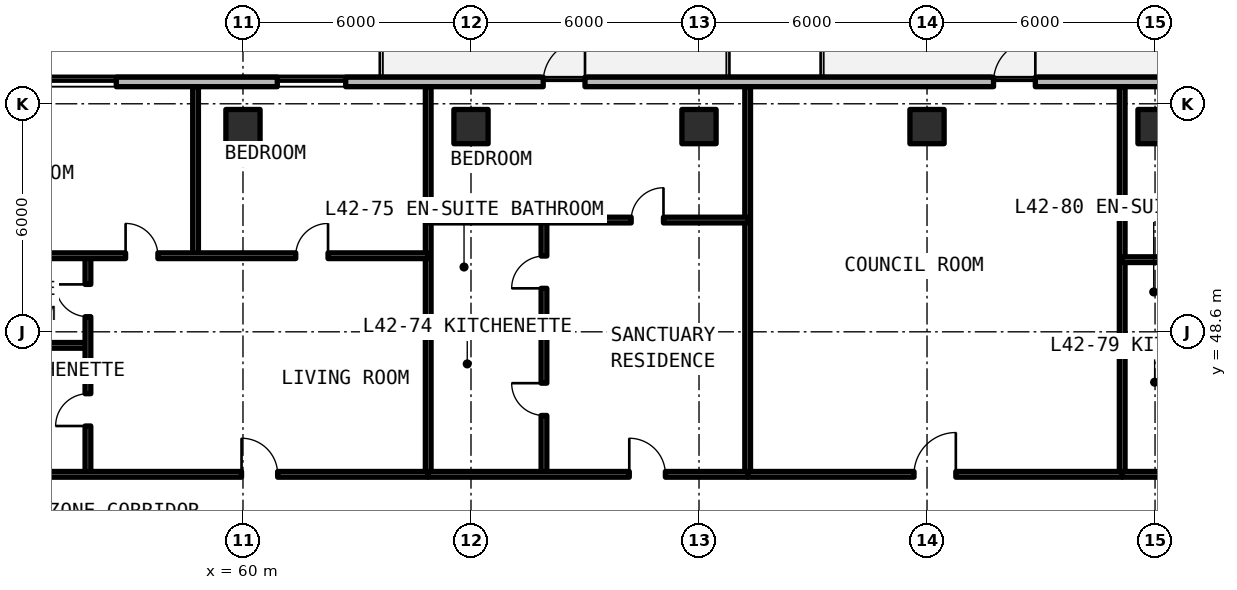
"""IFC4 building model, lengths in metres.
Left out: names, types, materials, properties, quantities, classifications, styles, units other than length and angle.
Written with IfcOpenShell. Run it as: python <this file> out.ifc"""

import sys

from ifc_helpers import new_model, si_unit, direction, frame, frame_2d, origin, origin_2d, place, context, subcontext, project, spatial, rectangle, extrude, element, fill, save


model = new_model("IFC4")
c1 = context("Model", 3, precision=1e-05, world=origin(), true_north=direction((0.0, 1.0)))
c2 = subcontext(c1, "Body", "Model", "MODEL_VIEW")
j1 = project(units=[si_unit("LENGTHUNIT", "METRE"), si_unit("PLANEANGLEUNIT", "RADIAN")], contexts=[c1])
p1 = place(None, origin())
s1 = spatial("IfcSite", under=j1, at=p1, CompositionType="ELEMENT")
p2 = place(p1, origin())
s2 = spatial("IfcBuilding", under=s1, at=p2, CompositionType="ELEMENT")
p3 = place(p2, frame((0.0, 0.0, 151.8)))
s3 = spatial("IfcBuildingStorey", under=s2, at=p3, CompositionType="ELEMENT", Elevation=151.8)
for number, where, z_axis, x_axis in (
    (1, (60.0, 54.0, 0.0), (0.0, 0.0, 1.0), (1.0, 0.0, 0.0)),
    (2, (66.0, 54.0, 0.0), (0.0, 0.0, 1.0), (1.0, 0.0, 0.0)),
    (3, (72.0, 54.0, 0.0), (0.0, 0.0, 1.0), (1.0, 0.0, 0.0)),
    (4, (78.0, 54.0, 0.0), (0.0, 0.0, 1.0), (1.0, 0.0, 0.0)),
    (5, (84.0, 54.0, 0.0), (0.0, 0.0, 1.0), (1.0, 0.0, 0.0)),
):
    element("IfcColumn", number, at=place(p3, frame(where, z_axis=z_axis, x_axis=x_axis)), inside=s3, PredefinedType="COLUMN", context=c2, shape_type="SweptSolid", body=[
        extrude(rectangle(XDim=0.9, YDim=0.9, at=origin_2d()), origin(), (0.0, 0.0, 1.0), 3.3),
    ])
p4 = place(p3, frame((95.748, 55.175, 0.0), z_axis=(0.0, 0.0, 1.0), x_axis=(-1.0, 0.0, 0.0)))
e6 = element("IfcWall", 6, at=p4, inside=s3, PredefinedType="SOLIDWALL", context=c2, shape_type="SweptSolid", body=[
    extrude(rectangle(XDim=43.623, YDim=0.25, at=frame_2d((21.812, 0.0))), origin(), (0.0, 0.0, 1.0), 3.08),
])
p5 = place(p4, frame((26.748, 0.0, 0.0)))
e7 = element("IfcOpeningElement", 7, at=p5, cuts=e6, PredefinedType="OPENING", context=c2, shape_type="SweptSolid", body=[
    extrude(rectangle(XDim=1.1, YDim=2.15, at=frame_2d((0.55, 1.075))), frame((0.0, 0.135, 0.0), z_axis=(0.0, -1.0, 0.0), x_axis=(1.0, 0.0, 0.0)), (0.0, 0.0, 1.0), 0.27),
])
p6 = place(p4, frame((14.898, 0.0, 0.0)))
e8 = element("IfcOpeningElement", 8, at=p6, cuts=e6, PredefinedType="OPENING", context=c2, shape_type="SweptSolid", body=[
    extrude(rectangle(XDim=1.1, YDim=2.15, at=frame_2d((0.55, 1.075))), frame((0.0, 0.135, 0.0), z_axis=(0.0, -1.0, 0.0), x_axis=(1.0, 0.0, 0.0)), (0.0, 0.0, 1.0), 0.27),
])
p7 = place(p4, frame((39.082, 0.0, 0.78)))
e9 = element("IfcOpeningElement", 9, at=p7, cuts=e6, PredefinedType="OPENING", context=c2, shape_type="SweptSolid", body=[
    extrude(rectangle(XDim=1.8, YDim=1.66, at=frame_2d((0.9, 0.83))), frame((0.0, 0.135, 0.0), z_axis=(0.0, -1.0, 0.0), x_axis=(1.0, 0.0, 0.0)), (0.0, 0.0, 1.0), 0.27),
])
p8 = place(p4, frame((33.045, 0.0, 0.78)))
e10 = element("IfcOpeningElement", 10, at=p8, cuts=e6, PredefinedType="OPENING", context=c2, shape_type="SweptSolid", body=[
    extrude(rectangle(XDim=1.8, YDim=1.66, at=frame_2d((0.9, 0.83))), frame((0.0, 0.135, 0.0), z_axis=(0.0, -1.0, 0.0), x_axis=(1.0, 0.0, 0.0)), (0.0, 0.0, 1.0), 0.27),
])
p9 = place(p4, frame((8.462, 0.0, 0.78)))
e11 = element("IfcOpeningElement", 11, at=p9, cuts=e6, PredefinedType="OPENING", context=c2, shape_type="SweptSolid", body=[
    extrude(rectangle(XDim=1.8, YDim=1.66, at=frame_2d((0.9, 0.83))), frame((0.0, 0.135, 0.0), z_axis=(0.0, -1.0, 0.0), x_axis=(1.0, 0.0, 0.0)), (0.0, 0.0, 1.0), 0.27),
])
p10 = place(p4, frame((2.25, 0.0, 0.78)))
e12 = element("IfcOpeningElement", 12, at=p10, cuts=e6, PredefinedType="OPENING", context=c2, shape_type="SweptSolid", body=[
    extrude(rectangle(XDim=1.8, YDim=1.66, at=frame_2d((0.9, 0.83))), frame((0.0, 0.135, 0.0), z_axis=(0.0, -1.0, 0.0), x_axis=(1.0, 0.0, 0.0)), (0.0, 0.0, 1.0), 0.27),
])
p11 = place(p3, frame((64.874, 44.85, 0.0), z_axis=(0.0, 0.0, 1.0), x_axis=(0.0, 1.0, 0.0)))
e13 = element("IfcWall", 13, at=p11, inside=s3, PredefinedType="SOLIDWALL", context=c2, shape_type="SweptSolid", body=[
    extrude(rectangle(XDim=10.2, YDim=0.15, at=frame_2d((5.1, 0.0))), origin(), (0.0, 0.0, 1.0), 2.35),
])
p12 = place(p3, frame((52.12, 48.244, 0.0), z_axis=(0.0, 0.0, 1.0), x_axis=(1.0, 0.0, 0.0)))
e14 = element("IfcWall", 14, at=p12, inside=s3, PredefinedType="PARTITIONING", context=c2, shape_type="SweptSolid", body=[
    extrude(rectangle(XDim=3.8, YDim=0.15, at=frame_2d((1.9, 0.0))), origin(), (0.0, 0.0, 1.0), 2.35),
])
p13 = place(p3, frame((55.92, 44.85, 0.0), z_axis=(0.0, 0.0, 1.0), x_axis=(0.0, 1.0, 0.0)))
e15 = element("IfcWall", 15, at=p13, inside=s3, PredefinedType="PARTITIONING", context=c2, shape_type="SweptSolid", body=[
    extrude(rectangle(XDim=5.752, YDim=0.15, at=frame_2d((2.876, 0.0))), origin(), (0.0, 0.0, 1.0), 2.35),
])
p14 = place(p13, frame((1.272, 0.0, 0.0)))
e16 = element("IfcOpeningElement", 16, at=p14, cuts=e15, PredefinedType="OPENING", context=c2, shape_type="SweptSolid", body=[
    extrude(rectangle(XDim=0.85, YDim=2.1, at=frame_2d((0.425, 1.05))), frame((0.0, 0.085, 0.0), z_axis=(0.0, -1.0, 0.0), x_axis=(1.0, 0.0, 0.0)), (0.0, 0.0, 1.0), 0.17),
])
p15 = place(p13, frame((4.148, 0.0, 0.0)))
e17 = element("IfcOpeningElement", 17, at=p15, cuts=e15, PredefinedType="OPENING", context=c2, shape_type="SweptSolid", body=[
    extrude(rectangle(XDim=0.85, YDim=2.1, at=frame_2d((0.425, 1.05))), frame((0.0, 0.085, 0.0), z_axis=(0.0, -1.0, 0.0), x_axis=(1.0, 0.0, 0.0)), (0.0, 0.0, 1.0), 0.17),
])
p16 = place(p3, frame((58.752, 50.602, 0.0), z_axis=(0.0, 0.0, 1.0), x_axis=(0.0, 1.0, 0.0)))
e18 = element("IfcWall", 18, at=p16, inside=s3, PredefinedType="PARTITIONING", context=c2, shape_type="SweptSolid", body=[
    extrude(rectangle(XDim=4.448, YDim=0.15, at=frame_2d((2.224, 0.0))), origin(), (0.0, 0.0, 1.0), 2.35),
])
p17 = place(p3, frame((52.12, 50.602, 0.0), z_axis=(0.0, 0.0, 1.0), x_axis=(1.0, 0.0, 0.0)))
e19 = element("IfcWall", 19, at=p17, inside=s3, PredefinedType="PARTITIONING", context=c2, shape_type="SweptSolid", body=[
    extrude(rectangle(XDim=12.754, YDim=0.15, at=frame_2d((6.377, 0.0))), origin(), (0.0, 0.0, 1.0), 2.35),
])
p18 = place(p17, frame((4.791, 0.0, 0.0)))
e20 = element("IfcOpeningElement", 20, at=p18, cuts=e19, PredefinedType="OPENING", context=c2, shape_type="SweptSolid", body=[
    extrude(rectangle(XDim=0.85, YDim=2.1, at=frame_2d((0.425, 1.05))), frame((0.0, 0.085, 0.0), z_axis=(0.0, -1.0, 0.0), x_axis=(1.0, 0.0, 0.0)), (0.0, 0.0, 1.0), 0.17),
])
p19 = place(p17, frame((9.268, 0.0, 0.0)))
e21 = element("IfcOpeningElement", 21, at=p19, cuts=e19, PredefinedType="OPENING", context=c2, shape_type="SweptSolid", body=[
    extrude(rectangle(XDim=0.85, YDim=2.1, at=frame_2d((0.425, 1.05))), frame((0.0, 0.085, 0.0), z_axis=(0.0, -1.0, 0.0), x_axis=(1.0, 0.0, 0.0)), (0.0, 0.0, 1.0), 0.17),
])
p20 = place(p3, frame((52.12, 44.85, 0.0), z_axis=(0.0, 0.0, 1.0), x_axis=(1.0, 0.0, 0.0)))
e22 = element("IfcWall", 22, at=p20, inside=s3, PredefinedType="SOLIDWALL", context=c2, shape_type="SweptSolid", body=[
    extrude(rectangle(XDim=12.754, YDim=0.15, at=frame_2d((6.377, 0.0))), origin(), (0.0, 0.0, 1.0), 2.35),
])
p21 = place(p20, frame((7.842, 0.0, 0.0)))
e23 = element("IfcOpeningElement", 23, at=p21, cuts=e22, PredefinedType="OPENING", context=c2, shape_type="SweptSolid", body=[
    extrude(rectangle(XDim=0.95, YDim=2.15, at=frame_2d((0.475, 1.075))), frame((0.0, 0.085, 0.0), z_axis=(0.0, -1.0, 0.0), x_axis=(1.0, 0.0, 0.0)), (0.0, 0.0, 1.0), 0.17),
])
p22 = place(p3, frame((73.28, 44.85, 0.0), z_axis=(0.0, 0.0, 1.0), x_axis=(0.0, 1.0, 0.0)))
e24 = element("IfcWall", 24, at=p22, inside=s3, PredefinedType="SOLIDWALL", context=c2, shape_type="SweptSolid", body=[
    extrude(rectangle(XDim=10.2, YDim=0.15, at=frame_2d((5.1, 0.0))), origin(), (0.0, 0.0, 1.0), 2.35),
])
p23 = place(p3, frame((64.874, 48.798, 0.0), z_axis=(0.0, 0.0, 1.0), x_axis=(1.0, 0.0, 0.0)))
e25 = element("IfcWall", 25, at=p23, inside=s3, PredefinedType="PARTITIONING", context=c2, shape_type="SweptSolid", body=[
    extrude(rectangle(XDim=3.046, YDim=0.15, at=frame_2d((1.523, 0.0))), origin(), (0.0, 0.0, 1.0), 2.35),
])
p24 = place(p3, frame((67.92, 44.85, 0.0), z_axis=(0.0, 0.0, 1.0), x_axis=(0.0, 1.0, 0.0)))
e26 = element("IfcWall", 26, at=p24, inside=s3, PredefinedType="PARTITIONING", context=c2, shape_type="SweptSolid", body=[
    extrude(rectangle(XDim=6.69, YDim=0.15, at=frame_2d((3.345, 0.0))), origin(), (0.0, 0.0, 1.0), 2.35),
])
p25 = place(p24, frame((1.549, 0.0, 0.0)))
e27 = element("IfcOpeningElement", 27, at=p25, cuts=e26, PredefinedType="OPENING", context=c2, shape_type="SweptSolid", body=[
    extrude(rectangle(XDim=0.85, YDim=2.1, at=frame_2d((0.425, 1.05))), frame((0.0, 0.085, 0.0), z_axis=(0.0, -1.0, 0.0), x_axis=(1.0, 0.0, 0.0)), (0.0, 0.0, 1.0), 0.17),
])
p26 = place(p24, frame((4.894, 0.0, 0.0)))
e28 = element("IfcOpeningElement", 28, at=p26, cuts=e26, PredefinedType="OPENING", context=c2, shape_type="SweptSolid", body=[
    extrude(rectangle(XDim=0.85, YDim=2.1, at=frame_2d((0.425, 1.05))), frame((0.0, 0.085, 0.0), z_axis=(0.0, -1.0, 0.0), x_axis=(1.0, 0.0, 0.0)), (0.0, 0.0, 1.0), 0.17),
])
p27 = place(p3, frame((64.874, 51.541, 0.0), z_axis=(0.0, 0.0, 1.0), x_axis=(1.0, 0.0, 0.0)))
e29 = element("IfcWall", 29, at=p27, inside=s3, PredefinedType="PARTITIONING", context=c2, shape_type="SweptSolid", body=[
    extrude(rectangle(XDim=8.406, YDim=0.15, at=frame_2d((4.203, 0.0))), origin(), (0.0, 0.0, 1.0), 2.35),
])
p28 = place(p27, frame((5.341, 0.0, 0.0)))
e30 = element("IfcOpeningElement", 30, at=p28, cuts=e29, PredefinedType="OPENING", context=c2, shape_type="SweptSolid", body=[
    extrude(rectangle(XDim=0.85, YDim=2.1, at=frame_2d((0.425, 1.05))), frame((0.0, 0.085, 0.0), z_axis=(0.0, -1.0, 0.0), x_axis=(1.0, 0.0, 0.0)), (0.0, 0.0, 1.0), 0.17),
])
p29 = place(p3, frame((64.874, 44.85, 0.0), z_axis=(0.0, 0.0, 1.0), x_axis=(1.0, 0.0, 0.0)))
e31 = element("IfcWall", 31, at=p29, inside=s3, PredefinedType="SOLIDWALL", context=c2, shape_type="SweptSolid", body=[
    extrude(rectangle(XDim=8.406, YDim=0.15, at=frame_2d((4.203, 0.0))), origin(), (0.0, 0.0, 1.0), 2.35),
])
p30 = place(p29, frame((5.291, 0.0, 0.0)))
e32 = element("IfcOpeningElement", 32, at=p30, cuts=e31, PredefinedType="OPENING", context=c2, shape_type="SweptSolid", body=[
    extrude(rectangle(XDim=0.95, YDim=2.15, at=frame_2d((0.475, 1.075))), frame((0.0, 0.085, 0.0), z_axis=(0.0, -1.0, 0.0), x_axis=(1.0, 0.0, 0.0)), (0.0, 0.0, 1.0), 0.17),
])
p31 = place(p3, frame((83.136, 44.85, 0.0), z_axis=(0.0, 0.0, 1.0), x_axis=(0.0, 1.0, 0.0)))
e33 = element("IfcWall", 33, at=p31, inside=s3, PredefinedType="SOLIDWALL", context=c2, shape_type="SweptSolid", body=[
    extrude(rectangle(XDim=10.2, YDim=0.15, at=frame_2d((5.1, 0.0))), origin(), (0.0, 0.0, 1.0), 2.35),
])
p32 = place(p3, frame((73.28, 44.85, 0.0), z_axis=(0.0, 0.0, 1.0), x_axis=(1.0, 0.0, 0.0)))
e34 = element("IfcWall", 34, at=p32, inside=s3, PredefinedType="SOLIDWALL", context=c2, shape_type="SweptSolid", body=[
    extrude(rectangle(XDim=9.855, YDim=0.15, at=frame_2d((4.928, 0.0))), origin(), (0.0, 0.0, 1.0), 2.35),
])
p33 = place(p32, frame((4.378, 0.0, 0.0)))
e35 = element("IfcOpeningElement", 35, at=p33, cuts=e34, PredefinedType="OPENING", context=c2, shape_type="SweptSolid", body=[
    extrude(rectangle(XDim=1.1, YDim=2.15, at=frame_2d((0.55, 1.075))), frame((0.0, 0.085, 0.0), z_axis=(0.0, -1.0, 0.0), x_axis=(1.0, 0.0, 0.0)), (0.0, 0.0, 1.0), 0.17),
])
p34 = place(p3, frame((83.136, 48.183, 0.0), z_axis=(0.0, 0.0, 1.0), x_axis=(1.0, 0.0, 0.0)))
e36 = element("IfcWall", 36, at=p34, inside=s3, PredefinedType="PARTITIONING", context=c2, shape_type="SweptSolid", body=[
    extrude(rectangle(XDim=2.784, YDim=0.15, at=frame_2d((1.392, 0.0))), origin(), (0.0, 0.0, 1.0), 2.35),
])
p35 = place(p3, frame((83.136, 50.499, 0.0), z_axis=(0.0, 0.0, 1.0), x_axis=(1.0, 0.0, 0.0)))
e37 = element("IfcWall", 37, at=p35, inside=s3, PredefinedType="PARTITIONING", context=c2, shape_type="SweptSolid", body=[
    extrude(rectangle(XDim=12.464, YDim=0.15, at=frame_2d((6.232, 0.0))), origin(), (0.0, 0.0, 1.0), 2.35),
])
p36 = place(p35, frame((4.208, 0.0, 0.0)))
e38 = element("IfcOpeningElement", 38, at=p36, cuts=e37, PredefinedType="OPENING", context=c2, shape_type="SweptSolid", body=[
    extrude(rectangle(XDim=0.85, YDim=2.1, at=frame_2d((0.425, 1.05))), frame((0.0, 0.085, 0.0), z_axis=(0.0, -1.0, 0.0), x_axis=(1.0, 0.0, 0.0)), (0.0, 0.0, 1.0), 0.17),
])
p37 = place(p35, frame((9.048, 0.0, 0.0)))
e39 = element("IfcOpeningElement", 39, at=p37, cuts=e37, PredefinedType="OPENING", context=c2, shape_type="SweptSolid", body=[
    extrude(rectangle(XDim=0.85, YDim=2.1, at=frame_2d((0.425, 1.05))), frame((0.0, 0.085, 0.0), z_axis=(0.0, -1.0, 0.0), x_axis=(1.0, 0.0, 0.0)), (0.0, 0.0, 1.0), 0.17),
])
p38 = place(p3, frame((83.136, 44.85, 0.0), z_axis=(0.0, 0.0, 1.0), x_axis=(1.0, 0.0, 0.0)))
e40 = element("IfcWall", 40, at=p38, inside=s3, PredefinedType="SOLIDWALL", context=c2, shape_type="SweptSolid", body=[
    extrude(rectangle(XDim=12.464, YDim=0.15, at=frame_2d((6.232, 0.0))), origin(), (0.0, 0.0, 1.0), 2.35),
])
p39 = place(p38, frame((7.189, 0.0, 0.0)))
e41 = element("IfcOpeningElement", 41, at=p39, cuts=e40, PredefinedType="OPENING", context=c2, shape_type="SweptSolid", body=[
    extrude(rectangle(XDim=0.95, YDim=2.15, at=frame_2d((0.475, 1.075))), frame((0.0, 0.085, 0.0), z_axis=(0.0, -1.0, 0.0), x_axis=(1.0, 0.0, 0.0)), (0.0, 0.0, 1.0), 0.17),
])
p40 = place(p5, frame((1.1, 0.0, 0.0), z_axis=(0.0, 0.0, 1.0), x_axis=(-1.0, 0.0, 0.0)))
e42 = element("IfcDoor", 42, at=p40, inside=s3, OperationType="SINGLE_SWING_RIGHT", PredefinedType="DOOR", context=c2, shape_type="SweptSolid", body=[
    extrude(rectangle(XDim=1.1, YDim=2.15, at=frame_2d((0.55, 1.075))), frame((0.0, 0.025, 0.0), z_axis=(0.0, -1.0, 0.0), x_axis=(1.0, 0.0, 0.0)), (0.0, 0.0, 1.0), 0.05),
])
fill(e7, e42)
p41 = place(p6, frame((1.1, 0.0, 0.0), z_axis=(0.0, 0.0, 1.0), x_axis=(-1.0, 0.0, 0.0)))
e43 = element("IfcDoor", 43, at=p41, inside=s3, OperationType="SINGLE_SWING_LEFT", PredefinedType="DOOR", context=c2, shape_type="SweptSolid", body=[
    extrude(rectangle(XDim=1.1, YDim=2.15, at=frame_2d((0.55, 1.075))), frame((0.0, 0.025, 0.0), z_axis=(0.0, -1.0, 0.0), x_axis=(1.0, 0.0, 0.0)), (0.0, 0.0, 1.0), 0.05),
])
fill(e8, e43)
p42 = place(p7, origin())
e44 = element("IfcWindow", 44, at=p42, inside=s3, PartitioningType="SINGLE_PANEL", PredefinedType="WINDOW", context=c2, shape_type="SweptSolid", body=[
    extrude(rectangle(XDim=1.8, YDim=1.66, at=frame_2d((0.9, 0.83))), frame((0.0, 0.03, 0.0), z_axis=(0.0, -1.0, 0.0), x_axis=(1.0, 0.0, 0.0)), (0.0, 0.0, 1.0), 0.06),
])
fill(e9, e44)
p43 = place(p8, origin())
e45 = element("IfcWindow", 45, at=p43, inside=s3, PartitioningType="SINGLE_PANEL", PredefinedType="WINDOW", context=c2, shape_type="SweptSolid", body=[
    extrude(rectangle(XDim=1.8, YDim=1.66, at=frame_2d((0.9, 0.83))), frame((0.0, 0.03, 0.0), z_axis=(0.0, -1.0, 0.0), x_axis=(1.0, 0.0, 0.0)), (0.0, 0.0, 1.0), 0.06),
])
fill(e10, e45)
p44 = place(p14, origin())
e46 = element("IfcDoor", 46, at=p44, inside=s3, OperationType="SINGLE_SWING_LEFT", PredefinedType="DOOR", context=c2, shape_type="SweptSolid", body=[
    extrude(rectangle(XDim=0.85, YDim=2.1, at=frame_2d((0.425, 1.05))), frame((0.0, 0.025, 0.0), z_axis=(0.0, -1.0, 0.0), x_axis=(1.0, 0.0, 0.0)), (0.0, 0.0, 1.0), 0.05),
])
fill(e16, e46)
p45 = place(p15, origin())
e47 = element("IfcDoor", 47, at=p45, inside=s3, OperationType="SINGLE_SWING_RIGHT", PredefinedType="DOOR", context=c2, shape_type="SweptSolid", body=[
    extrude(rectangle(XDim=0.85, YDim=2.1, at=frame_2d((0.425, 1.05))), frame((0.0, 0.025, 0.0), z_axis=(0.0, -1.0, 0.0), x_axis=(1.0, 0.0, 0.0)), (0.0, 0.0, 1.0), 0.05),
])
fill(e17, e47)
p46 = place(p18, origin())
e48 = element("IfcDoor", 48, at=p46, inside=s3, OperationType="SINGLE_SWING_LEFT", PredefinedType="DOOR", context=c2, shape_type="SweptSolid", body=[
    extrude(rectangle(XDim=0.85, YDim=2.1, at=frame_2d((0.425, 1.05))), frame((0.0, 0.025, 0.0), z_axis=(0.0, -1.0, 0.0), x_axis=(1.0, 0.0, 0.0)), (0.0, 0.0, 1.0), 0.05),
])
fill(e20, e48)
p47 = place(p19, origin())
e49 = element("IfcDoor", 49, at=p47, inside=s3, OperationType="SINGLE_SWING_RIGHT", PredefinedType="DOOR", context=c2, shape_type="SweptSolid", body=[
    extrude(rectangle(XDim=0.85, YDim=2.1, at=frame_2d((0.425, 1.05))), frame((0.0, 0.025, 0.0), z_axis=(0.0, -1.0, 0.0), x_axis=(1.0, 0.0, 0.0)), (0.0, 0.0, 1.0), 0.05),
])
fill(e21, e49)
p48 = place(p21, origin())
e50 = element("IfcDoor", 50, at=p48, inside=s3, OperationType="SINGLE_SWING_LEFT", PredefinedType="DOOR", context=c2, shape_type="SweptSolid", body=[
    extrude(rectangle(XDim=0.95, YDim=2.15, at=frame_2d((0.475, 1.075))), frame((0.0, 0.025, 0.0), z_axis=(0.0, -1.0, 0.0), x_axis=(1.0, 0.0, 0.0)), (0.0, 0.0, 1.0), 0.05),
])
fill(e23, e50)
p49 = place(p25, origin())
e51 = element("IfcDoor", 51, at=p49, inside=s3, OperationType="SINGLE_SWING_RIGHT", PredefinedType="DOOR", context=c2, shape_type="SweptSolid", body=[
    extrude(rectangle(XDim=0.85, YDim=2.1, at=frame_2d((0.425, 1.05))), frame((0.0, 0.025, 0.0), z_axis=(0.0, -1.0, 0.0), x_axis=(1.0, 0.0, 0.0)), (0.0, 0.0, 1.0), 0.05),
])
fill(e27, e51)
p50 = place(p26, origin())
e52 = element("IfcDoor", 52, at=p50, inside=s3, OperationType="SINGLE_SWING_LEFT", PredefinedType="DOOR", context=c2, shape_type="SweptSolid", body=[
    extrude(rectangle(XDim=0.85, YDim=2.1, at=frame_2d((0.425, 1.05))), frame((0.0, 0.025, 0.0), z_axis=(0.0, -1.0, 0.0), x_axis=(1.0, 0.0, 0.0)), (0.0, 0.0, 1.0), 0.05),
])
fill(e28, e52)
p51 = place(p28, origin())
e53 = element("IfcDoor", 53, at=p51, inside=s3, OperationType="SINGLE_SWING_RIGHT", PredefinedType="DOOR", context=c2, shape_type="SweptSolid", body=[
    extrude(rectangle(XDim=0.85, YDim=2.1, at=frame_2d((0.425, 1.05))), frame((0.0, 0.025, 0.0), z_axis=(0.0, -1.0, 0.0), x_axis=(1.0, 0.0, 0.0)), (0.0, 0.0, 1.0), 0.05),
])
fill(e30, e53)
p52 = place(p30, origin())
e54 = element("IfcDoor", 54, at=p52, inside=s3, OperationType="SINGLE_SWING_LEFT", PredefinedType="DOOR", context=c2, shape_type="SweptSolid", body=[
    extrude(rectangle(XDim=0.95, YDim=2.15, at=frame_2d((0.475, 1.075))), frame((0.0, 0.025, 0.0), z_axis=(0.0, -1.0, 0.0), x_axis=(1.0, 0.0, 0.0)), (0.0, 0.0, 1.0), 0.05),
])
fill(e32, e54)
p53 = place(p33, origin())
e55 = element("IfcDoor", 55, at=p53, inside=s3, OperationType="SINGLE_SWING_RIGHT", PredefinedType="DOOR", context=c2, shape_type="SweptSolid", body=[
    extrude(rectangle(XDim=1.1, YDim=2.15, at=frame_2d((0.55, 1.075))), frame((0.0, 0.025, 0.0), z_axis=(0.0, -1.0, 0.0), x_axis=(1.0, 0.0, 0.0)), (0.0, 0.0, 1.0), 0.05),
])
fill(e35, e55)
save(model, sys.argv[1])
